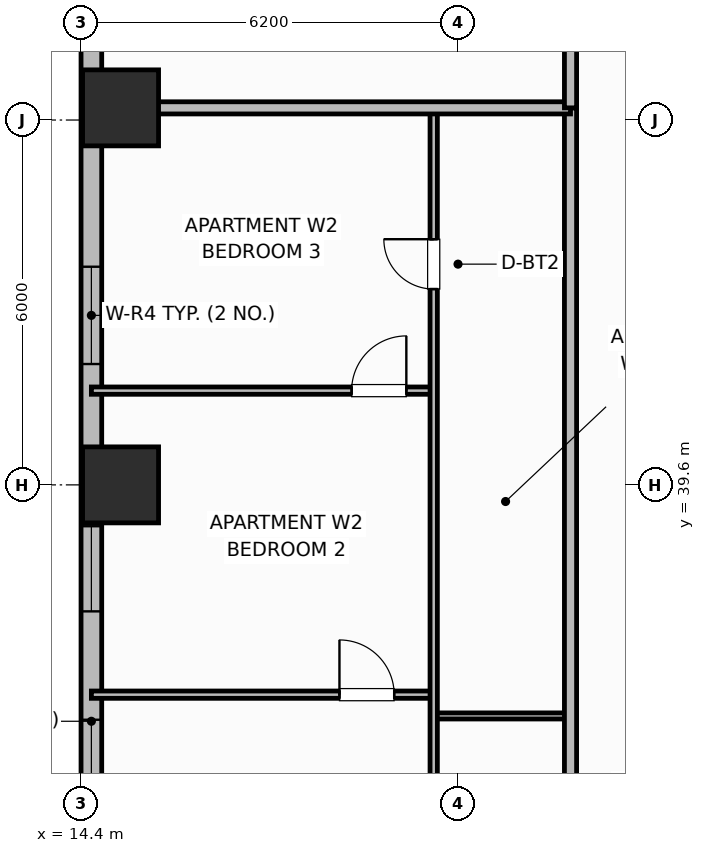
"""IFC4 building model, lengths in metres.
Left out: names, types, materials, properties, quantities, classifications, styles, units other than length and angle.
Written with IfcOpenShell. Run it as: python <this file> out.ifc"""

import sys

from ifc_helpers import new_model, si_unit, direction, frame, frame_2d, origin, origin_2d, place, context, subcontext, project, spatial, rectangle, extrude, element, fill, save


model = new_model("IFC4")
c1 = context("Model", 3, precision=1e-05, world=origin(), true_north=direction((0.0, 1.0)))
c2 = subcontext(c1, "Body", "Model", "MODEL_VIEW")
j1 = project(units=[si_unit("LENGTHUNIT", "METRE"), si_unit("PLANEANGLEUNIT", "RADIAN")], contexts=[c1])
p1 = place(None, origin())
s1 = spatial("IfcSite", under=j1, at=p1, CompositionType="ELEMENT")
p2 = place(p1, origin())
s2 = spatial("IfcBuilding", under=s1, at=p2, CompositionType="ELEMENT")
p3 = place(p2, frame((0.0, 0.0, 32.5)))
s3 = spatial("IfcBuildingStorey", under=s2, at=p3, CompositionType="ELEMENT", Elevation=32.5)
for number, where, z_axis, x_axis in (
    (1, (15.05, 39.6, 0.0), (0.0, 0.0, 1.0), (1.0, 0.0, 0.0)),
    (2, (15.05, 45.8, 0.0), (0.0, 0.0, 1.0), (1.0, 0.0, 0.0)),
):
    element("IfcColumn", number, at=place(p3, frame(where, z_axis=z_axis, x_axis=x_axis)), inside=s3, PredefinedType="COLUMN", context=c2, shape_type="SweptSolid", body=[
        extrude(rectangle(XDim=1.25, YDim=1.25, at=origin_2d()), origin(), (0.0, 0.0, 1.0), 3.7),
    ])
p4 = place(p3, frame((14.57, 47.4, 0.0), z_axis=(0.0, 0.0, 1.0), x_axis=(0.0, -1.0, 0.0)))
e3 = element("IfcWall", 3, at=p4, inside=s3, PredefinedType="SOLIDWALL", context=c2, shape_type="SweptSolid", body=[
    extrude(rectangle(XDim=14.8, YDim=0.34, at=frame_2d((7.4, 0.0))), origin(), (0.0, 0.0, 1.0), 2.7),
])
p5 = place(p4, frame((4.212, 0.0, 0.68)))
e4 = element("IfcOpeningElement", 4, at=p5, cuts=e3, PredefinedType="OPENING", context=c2, shape_type="SweptSolid", body=[
    extrude(rectangle(XDim=1.6, YDim=1.9, at=frame_2d((0.8, 0.95))), frame((0.0, 0.18, 0.0), z_axis=(0.0, -1.0, 0.0), x_axis=(1.0, 0.0, 0.0)), (0.0, 0.0, 1.0), 0.36),
])
p6 = place(p4, frame((8.48, 0.0, 0.69)))
e5 = element("IfcOpeningElement", 5, at=p6, cuts=e3, PredefinedType="OPENING", context=c2, shape_type="SweptSolid", body=[
    extrude(rectangle(XDim=1.4, YDim=1.85, at=frame_2d((0.7, 0.925))), frame((0.0, 0.18, 0.0), z_axis=(0.0, -1.0, 0.0), x_axis=(1.0, 0.0, 0.0)), (0.0, 0.0, 1.0), 0.36),
])
p7 = place(p4, frame((11.663, 0.0, 0.68)))
e6 = element("IfcOpeningElement", 6, at=p7, cuts=e3, PredefinedType="OPENING", context=c2, shape_type="SweptSolid", body=[
    extrude(rectangle(XDim=1.6, YDim=1.9, at=frame_2d((0.8, 0.95))), frame((0.0, 0.18, 0.0), z_axis=(0.0, -1.0, 0.0), x_axis=(1.0, 0.0, 0.0)), (0.0, 0.0, 1.0), 0.36),
])
p8 = place(p3, frame((20.2, 35.8, 0.0), z_axis=(0.0, 0.0, 1.0), x_axis=(1.0, 0.0, 0.0)))
e7 = element("IfcWall", 7, at=p8, inside=s3, PredefinedType="PARTITIONING", context=c2, shape_type="SweptSolid", body=[
    extrude(rectangle(XDim=2.25, YDim=0.1, at=frame_2d((1.125, 0.0))), origin(), (0.0, 0.0, 1.0), 2.53),
])
p9 = place(p3, frame((14.57, 36.15, 0.0), z_axis=(0.0, 0.0, 1.0), x_axis=(1.0, 0.0, 0.0)))
e8 = element("IfcWall", 8, at=p9, inside=s3, PredefinedType="PARTITIONING", context=c2, shape_type="SweptSolid", body=[
    extrude(rectangle(XDim=5.63, YDim=0.12, at=frame_2d((2.815, 0.0))), origin(), (0.0, 0.0, 1.0), 2.53),
])
p10 = place(p9, frame((4.08, 0.0, 0.0)))
e9 = element("IfcOpeningElement", 9, at=p10, cuts=e8, PredefinedType="OPENING", context=c2, shape_type="SweptSolid", body=[
    extrude(rectangle(XDim=0.9, YDim=2.1, at=frame_2d((0.45, 1.05))), frame((0.0, 0.07, 0.0), z_axis=(0.0, -1.0, 0.0), x_axis=(1.0, 0.0, 0.0)), (0.0, 0.0, 1.0), 0.14),
])
p11 = place(p3, frame((14.57, 41.15, 0.0), z_axis=(0.0, 0.0, 1.0), x_axis=(1.0, 0.0, 0.0)))
e10 = element("IfcWall", 10, at=p11, inside=s3, PredefinedType="PARTITIONING", context=c2, shape_type="SweptSolid", body=[
    extrude(rectangle(XDim=5.63, YDim=0.12, at=frame_2d((2.815, 0.0))), origin(), (0.0, 0.0, 1.0), 2.53),
])
p12 = place(p11, frame((4.28, 0.0, 0.0)))
e11 = element("IfcOpeningElement", 11, at=p12, cuts=e10, PredefinedType="OPENING", context=c2, shape_type="SweptSolid", body=[
    extrude(rectangle(XDim=0.9, YDim=2.1, at=frame_2d((0.45, 1.05))), frame((0.0, 0.07, 0.0), z_axis=(0.0, -1.0, 0.0), x_axis=(1.0, 0.0, 0.0)), (0.0, 0.0, 1.0), 0.14),
])
p13 = place(p3, frame((20.2, 26.64, 0.0), z_axis=(0.0, 0.0, 1.0), x_axis=(0.0, 1.0, 0.0)))
e12 = element("IfcWall", 12, at=p13, inside=s3, PredefinedType="PARTITIONING", context=c2, shape_type="SweptSolid", body=[
    extrude(rectangle(XDim=19.12, YDim=0.12, at=frame_2d((9.56, 0.0))), origin(), (0.0, 0.0, 1.0), 2.53),
])
p14 = place(p13, frame((2.81, 0.0, 0.0)))
e13 = element("IfcOpeningElement", 13, at=p14, cuts=e12, PredefinedType="OPENING", context=c2, shape_type="SweptSolid", body=[
    extrude(rectangle(XDim=0.9, YDim=2.1, at=frame_2d((0.45, 1.05))), frame((0.0, 0.07, 0.0), z_axis=(0.0, -1.0, 0.0), x_axis=(1.0, 0.0, 0.0)), (0.0, 0.0, 1.0), 0.14),
])
p15 = place(p13, frame((16.18, 0.0, 0.0)))
e14 = element("IfcOpeningElement", 14, at=p15, cuts=e12, PredefinedType="OPENING", context=c2, shape_type="SweptSolid", body=[
    extrude(rectangle(XDim=0.82, YDim=2.08, at=frame_2d((0.41, 1.04))), frame((0.0, 0.07, 0.0), z_axis=(0.0, -1.0, 0.0), x_axis=(1.0, 0.0, 0.0)), (0.0, 0.0, 1.0), 0.14),
])
p16 = place(p3, frame((22.45, 10.6, 0.0), z_axis=(0.0, 0.0, 1.0), x_axis=(0.0, 1.0, 0.0)))
e15 = element("IfcWall", 15, at=p16, inside=s3, PredefinedType="PARTITIONING", context=c2, shape_type="SweptSolid", body=[
    extrude(rectangle(XDim=35.2, YDim=0.2, at=frame_2d((17.6, 0.0))), origin(), (0.0, 0.0, 1.0), 2.53),
])
p17 = place(p16, frame((2.65, 0.0, 0.0)))
e16 = element("IfcOpeningElement", 16, at=p17, cuts=e15, PredefinedType="OPENING", context=c2, shape_type="SweptSolid", body=[
    extrude(rectangle(XDim=1.0, YDim=2.15, at=frame_2d((0.5, 1.075))), frame((0.0, 0.11, 0.0), z_axis=(0.0, -1.0, 0.0), x_axis=(1.0, 0.0, 0.0)), (0.0, 0.0, 1.0), 0.22),
])
p18 = place(p16, frame((19.95, 0.0, 0.0)))
e17 = element("IfcOpeningElement", 17, at=p18, cuts=e15, PredefinedType="OPENING", context=c2, shape_type="SweptSolid", body=[
    extrude(rectangle(XDim=1.0, YDim=2.15, at=frame_2d((0.5, 1.075))), frame((0.0, 0.11, 0.0), z_axis=(0.0, -1.0, 0.0), x_axis=(1.0, 0.0, 0.0)), (0.0, 0.0, 1.0), 0.22),
])
p19 = place(p3, frame((14.99, 45.8, 0.0), z_axis=(0.0, 0.0, 1.0), x_axis=(1.0, 0.0, 0.0)))
e18 = element("IfcWall", 18, at=p19, inside=s3, PredefinedType="PARTITIONING", context=c2, shape_type="SweptSolid", body=[
    extrude(rectangle(XDim=7.46, YDim=0.2, at=frame_2d((3.73, 0.0))), origin(), (0.0, 0.0, 1.0), 2.53),
])
p20 = place(p3, frame((22.45, 45.8, 0.0), z_axis=(0.0, 0.0, 1.0), x_axis=(0.0, 1.0, 0.0)))
e19 = element("IfcWall", 19, at=p20, inside=s3, PredefinedType="PARTITIONING", context=c2, shape_type="SweptSolid", body=[
    extrude(rectangle(XDim=5.63, YDim=0.2, at=frame_2d((2.815, 0.0))), origin(), (0.0, 0.0, 1.0), 2.53),
])
p21 = place(p5, origin())
e20 = element("IfcWindow", 20, at=p21, inside=s3, PartitioningType="SINGLE_PANEL", PredefinedType="WINDOW", context=c2, shape_type="SweptSolid", body=[
    extrude(rectangle(XDim=1.6, YDim=1.9, at=frame_2d((0.8, 0.95))), frame((0.0, 0.03, 0.0), z_axis=(0.0, -1.0, 0.0), x_axis=(1.0, 0.0, 0.0)), (0.0, 0.0, 1.0), 0.06),
])
fill(e4, e20)
p22 = place(p6, origin())
e21 = element("IfcWindow", 21, at=p22, inside=s3, PartitioningType="SINGLE_PANEL", PredefinedType="WINDOW", context=c2, shape_type="SweptSolid", body=[
    extrude(rectangle(XDim=1.4, YDim=1.85, at=frame_2d((0.7, 0.925))), frame((0.0, 0.03, 0.0), z_axis=(0.0, -1.0, 0.0), x_axis=(1.0, 0.0, 0.0)), (0.0, 0.0, 1.0), 0.06),
])
fill(e5, e21)
p23 = place(p7, origin())
e22 = element("IfcWindow", 22, at=p23, inside=s3, PartitioningType="SINGLE_PANEL", PredefinedType="WINDOW", context=c2, shape_type="SweptSolid", body=[
    extrude(rectangle(XDim=1.6, YDim=1.9, at=frame_2d((0.8, 0.95))), frame((0.0, 0.03, 0.0), z_axis=(0.0, -1.0, 0.0), x_axis=(1.0, 0.0, 0.0)), (0.0, 0.0, 1.0), 0.06),
])
fill(e6, e22)
p24 = place(p10, origin())
e23 = element("IfcDoor", 23, at=p24, inside=s3, OperationType="SINGLE_SWING_LEFT", PredefinedType="DOOR", context=c2, shape_type="SweptSolid", body=[
    extrude(rectangle(XDim=0.9, YDim=2.1, at=frame_2d((0.45, 1.05))), frame((0.0, 0.025, 0.0), z_axis=(0.0, -1.0, 0.0), x_axis=(1.0, 0.0, 0.0)), (0.0, 0.0, 1.0), 0.05),
])
fill(e9, e23)
p25 = place(p12, origin())
e24 = element("IfcDoor", 24, at=p25, inside=s3, OperationType="SINGLE_SWING_RIGHT", PredefinedType="DOOR", context=c2, shape_type="SweptSolid", body=[
    extrude(rectangle(XDim=0.9, YDim=2.1, at=frame_2d((0.45, 1.05))), frame((0.0, 0.025, 0.0), z_axis=(0.0, -1.0, 0.0), x_axis=(1.0, 0.0, 0.0)), (0.0, 0.0, 1.0), 0.05),
])
fill(e11, e24)
p26 = place(p15, origin())
e25 = element("IfcDoor", 25, at=p26, inside=s3, OperationType="SINGLE_SWING_RIGHT", PredefinedType="DOOR", context=c2, shape_type="SweptSolid", body=[
    extrude(rectangle(XDim=0.82, YDim=2.08, at=frame_2d((0.41, 1.04))), frame((0.0, 0.025, 0.0), z_axis=(0.0, -1.0, 0.0), x_axis=(1.0, 0.0, 0.0)), (0.0, 0.0, 1.0), 0.05),
])
fill(e14, e25)
save(model, sys.argv[1])
